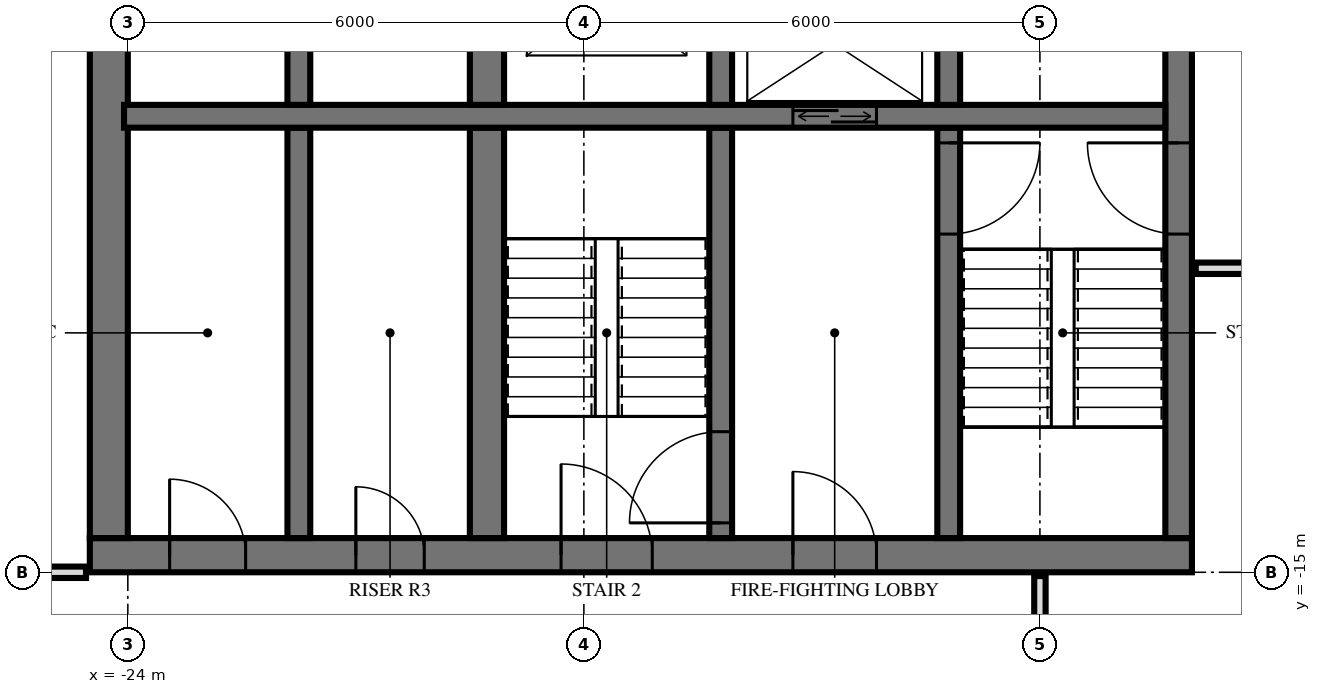
"""IFC4 building model, lengths in metres.
Left out: names, types, materials, properties, quantities, classifications, styles, units other than length and angle.
Written with IfcOpenShell. Run it as: python <this file> out.ifc"""

import sys

from ifc_helpers import new_model, si_unit, direction, frame, frame_2d, origin, place, context, subcontext, project, spatial, rectangle, extrude, element, fill, save


model = new_model("IFC4")
c1 = context("Model", 3, precision=1e-05, world=origin(), true_north=direction((0.0, 1.0)))
c2 = subcontext(c1, "Body", "Model", "MODEL_VIEW")
j1 = project(units=[si_unit("LENGTHUNIT", "METRE"), si_unit("PLANEANGLEUNIT", "RADIAN")], contexts=[c1])
p1 = place(None, origin())
s1 = spatial("IfcSite", under=j1, at=p1, CompositionType="ELEMENT")
p2 = place(p1, origin())
s2 = spatial("IfcBuilding", under=s1, at=p2, CompositionType="ELEMENT")
p3 = place(p2, frame((0.0, 0.0, 141.6)))
s3 = spatial("IfcBuildingStorey", under=s2, at=p3, CompositionType="ELEMENT", Elevation=141.6)
p4 = place(p3, frame((-24.5, -14.775, 0.0), z_axis=(0.0, 0.0, 1.0), x_axis=(1.0, 0.0, 0.0)))
e1 = element("IfcWall", 1, at=p4, inside=s3, PredefinedType="SHEAR", context=c2, shape_type="SweptSolid", body=[
    extrude(rectangle(XDim=14.5, YDim=0.45, at=frame_2d((7.25, 0.0))), origin(), (0.0, 0.0, 1.0), 3.6),
])
p5 = place(p4, frame((6.2, 0.0, 0.0)))
e2 = element("IfcOpeningElement", 2, at=p5, cuts=e1, PredefinedType="OPENING", context=c2, shape_type="SweptSolid", body=[
    extrude(rectangle(XDim=1.2, YDim=2.1, at=frame_2d((0.6, 1.05))), frame((0.0, 0.235, 0.0), z_axis=(0.0, -1.0, 0.0), x_axis=(1.0, 0.0, 0.0)), (0.0, 0.0, 1.0), 0.47),
])
p6 = place(p4, frame((9.25, 0.0, 0.0)))
e3 = element("IfcOpeningElement", 3, at=p6, cuts=e1, PredefinedType="OPENING", context=c2, shape_type="SweptSolid", body=[
    extrude(rectangle(XDim=1.1, YDim=2.1, at=frame_2d((0.55, 1.05))), frame((0.0, 0.235, 0.0), z_axis=(0.0, -1.0, 0.0), x_axis=(1.0, 0.0, 0.0)), (0.0, 0.0, 1.0), 0.47),
])
p7 = place(p4, frame((3.5, 0.0, 0.0)))
e4 = element("IfcOpeningElement", 4, at=p7, cuts=e1, PredefinedType="OPENING", context=c2, shape_type="SweptSolid", body=[
    extrude(rectangle(XDim=0.9, YDim=2.1, at=frame_2d((0.45, 1.05))), frame((0.0, 0.235, 0.0), z_axis=(0.0, -1.0, 0.0), x_axis=(1.0, 0.0, 0.0)), (0.0, 0.0, 1.0), 0.47),
])
p8 = place(p4, frame((1.05, 0.0, 0.0)))
e5 = element("IfcOpeningElement", 5, at=p8, cuts=e1, PredefinedType="OPENING", context=c2, shape_type="SweptSolid", body=[
    extrude(rectangle(XDim=1.0, YDim=2.1, at=frame_2d((0.5, 1.05))), frame((0.0, 0.235, 0.0), z_axis=(0.0, -1.0, 0.0), x_axis=(1.0, 0.0, 0.0)), (0.0, 0.0, 1.0), 0.47),
])
p9 = place(p3, frame((-10.175, -14.55, 0.0), z_axis=(0.0, 0.0, 1.0), x_axis=(0.0, 1.0, 0.0)))
e6 = element("IfcWall", 6, at=p9, inside=s3, PredefinedType="SHEAR", context=c2, shape_type="SweptSolid", body=[
    extrude(rectangle(XDim=14.1, YDim=0.35, at=frame_2d((7.05, 0.0))), origin(), (0.0, 0.0, 1.0), 3.6),
])
p10 = place(p9, frame((8.4, 0.0, 0.0)))
e7 = element("IfcOpeningElement", 7, at=p10, cuts=e6, PredefinedType="OPENING", context=c2, shape_type="SweptSolid", body=[
    extrude(rectangle(XDim=1.4, YDim=2.4, at=frame_2d((0.7, 1.2))), frame((0.0, 0.185, 0.0), z_axis=(0.0, -1.0, 0.0), x_axis=(1.0, 0.0, 0.0)), (0.0, 0.0, 1.0), 0.37),
])
p11 = place(p9, frame((10.0, 0.0, 0.0)))
e8 = element("IfcOpeningElement", 8, at=p11, cuts=e6, PredefinedType="OPENING", context=c2, shape_type="SweptSolid", body=[
    extrude(rectangle(XDim=1.4, YDim=2.4, at=frame_2d((0.7, 1.2))), frame((0.0, 0.185, 0.0), z_axis=(0.0, -1.0, 0.0), x_axis=(1.0, 0.0, 0.0)), (0.0, 0.0, 1.0), 0.37),
])
p12 = place(p9, frame((4.0, 0.0, 0.0)))
e9 = element("IfcOpeningElement", 9, at=p12, cuts=e6, PredefinedType="OPENING", context=c2, shape_type="SweptSolid", body=[
    extrude(rectangle(XDim=1.2, YDim=2.1, at=frame_2d((0.6, 1.05))), frame((0.0, 0.185, 0.0), z_axis=(0.0, -1.0, 0.0), x_axis=(1.0, 0.0, 0.0)), (0.0, 0.0, 1.0), 0.37),
])
p13 = place(p3, frame((-24.25, -14.55, 0.0), z_axis=(0.0, 0.0, 1.0), x_axis=(0.0, 1.0, 0.0)))
e10 = element("IfcWall", 10, at=p13, inside=s3, PredefinedType="SHEAR", context=c2, shape_type="SweptSolid", body=[
    extrude(rectangle(XDim=14.1, YDim=0.5, at=frame_2d((7.05, 0.0))), origin(), (0.0, 0.0, 1.0), 3.6),
])
p14 = place(p3, frame((-24.05, -9.0, 0.0), z_axis=(0.0, 0.0, 1.0), x_axis=(1.0, 0.0, 0.0)))
e11 = element("IfcWall", 11, at=p14, inside=s3, PredefinedType="SHEAR", context=c2, shape_type="SweptSolid", body=[
    extrude(rectangle(XDim=13.7, YDim=0.3, at=frame_2d((6.85, 0.0))), origin(), (0.0, 0.0, 1.0), 3.6),
])
p15 = place(p14, frame((8.8, 0.0, 0.0)))
e12 = element("IfcOpeningElement", 12, at=p15, cuts=e11, PredefinedType="OPENING", context=c2, shape_type="SweptSolid", body=[
    extrude(rectangle(XDim=1.1, YDim=2.1, at=frame_2d((0.55, 1.05))), frame((0.0, 0.16, 0.0), z_axis=(0.0, -1.0, 0.0), x_axis=(1.0, 0.0, 0.0)), (0.0, 0.0, 1.0), 0.32),
])
p16 = place(p3, frame((-13.2, -8.85, 0.0), z_axis=(0.0, 0.0, 1.0), x_axis=(0.0, 1.0, 0.0)))
e13 = element("IfcWall", 13, at=p16, inside=s3, PredefinedType="SHEAR", context=c2, shape_type="SweptSolid", body=[
    extrude(rectangle(XDim=2.3, YDim=0.3, at=frame_2d((1.15, 0.0))), origin(), (0.0, 0.0, 1.0), 3.6),
])
p17 = place(p3, frame((-13.2, -14.55, 0.0), z_axis=(0.0, 0.0, 1.0), x_axis=(0.0, 1.0, 0.0)))
e14 = element("IfcWall", 14, at=p17, inside=s3, PredefinedType="SHEAR", context=c2, shape_type="SweptSolid", body=[
    extrude(rectangle(XDim=5.4, YDim=0.3, at=frame_2d((2.7, 0.0))), origin(), (0.0, 0.0, 1.0), 3.6),
])
p18 = place(p17, frame((4.0, 0.0, 0.0)))
e15 = element("IfcOpeningElement", 15, at=p18, cuts=e14, PredefinedType="OPENING", context=c2, shape_type="SweptSolid", body=[
    extrude(rectangle(XDim=1.2, YDim=2.1, at=frame_2d((0.6, 1.05))), frame((0.0, 0.16, 0.0), z_axis=(0.0, -1.0, 0.0), x_axis=(1.0, 0.0, 0.0)), (0.0, 0.0, 1.0), 0.32),
])
p19 = place(p3, frame((-16.2, -8.85, 0.0), z_axis=(0.0, 0.0, 1.0), x_axis=(0.0, 1.0, 0.0)))
e16 = element("IfcWall", 16, at=p19, inside=s3, PredefinedType="SHEAR", context=c2, shape_type="SweptSolid", body=[
    extrude(rectangle(XDim=2.3, YDim=0.3, at=frame_2d((1.15, 0.0))), origin(), (0.0, 0.0, 1.0), 3.6),
])
p20 = place(p3, frame((-16.2, -14.55, 0.0), z_axis=(0.0, 0.0, 1.0), x_axis=(0.0, 1.0, 0.0)))
e17 = element("IfcWall", 17, at=p20, inside=s3, PredefinedType="SHEAR", context=c2, shape_type="SweptSolid", body=[
    extrude(rectangle(XDim=5.4, YDim=0.3, at=frame_2d((2.7, 0.0))), origin(), (0.0, 0.0, 1.0), 3.6),
])
p21 = place(p20, frame((0.2, 0.0, 0.0)))
e18 = element("IfcOpeningElement", 18, at=p21, cuts=e17, PredefinedType="OPENING", context=c2, shape_type="SweptSolid", body=[
    extrude(rectangle(XDim=1.2, YDim=2.1, at=frame_2d((0.6, 1.05))), frame((0.0, 0.16, 0.0), z_axis=(0.0, -1.0, 0.0), x_axis=(1.0, 0.0, 0.0)), (0.0, 0.0, 1.0), 0.32),
])
p22 = place(p3, frame((-19.275, -8.85, 0.0), z_axis=(0.0, 0.0, 1.0), x_axis=(0.0, 1.0, 0.0)))
e19 = element("IfcWall", 19, at=p22, inside=s3, PredefinedType="SHEAR", context=c2, shape_type="SweptSolid", body=[
    extrude(rectangle(XDim=2.3, YDim=0.45, at=frame_2d((1.15, 0.0))), origin(), (0.0, 0.0, 1.0), 3.6),
])
p23 = place(p3, frame((-19.275, -14.55, 0.0), z_axis=(0.0, 0.0, 1.0), x_axis=(0.0, 1.0, 0.0)))
e20 = element("IfcWall", 20, at=p23, inside=s3, PredefinedType="SHEAR", context=c2, shape_type="SweptSolid", body=[
    extrude(rectangle(XDim=5.4, YDim=0.45, at=frame_2d((2.7, 0.0))), origin(), (0.0, 0.0, 1.0), 3.6),
])
p24 = place(p3, frame((-21.75, -8.85, 0.0), z_axis=(0.0, 0.0, 1.0), x_axis=(0.0, 1.0, 0.0)))
e21 = element("IfcWall", 21, at=p24, inside=s3, PredefinedType="SHEAR", context=c2, shape_type="SweptSolid", body=[
    extrude(rectangle(XDim=2.3, YDim=0.3, at=frame_2d((1.15, 0.0))), origin(), (0.0, 0.0, 1.0), 3.6),
])
p25 = place(p3, frame((-21.75, -14.55, 0.0), z_axis=(0.0, 0.0, 1.0), x_axis=(0.0, 1.0, 0.0)))
e22 = element("IfcWall", 22, at=p25, inside=s3, PredefinedType="SHEAR", context=c2, shape_type="SweptSolid", body=[
    extrude(rectangle(XDim=5.4, YDim=0.3, at=frame_2d((2.7, 0.0))), origin(), (0.0, 0.0, 1.0), 3.6),
])
p26 = place(p3, frame((-12.0, -17.4, 0.0), z_axis=(0.0, 0.0, 1.0), x_axis=(0.0, 1.0, 0.0)))
e23 = element("IfcWall", 23, at=p26, inside=s3, PredefinedType="PARTITIONING", context=c2, shape_type="SweptSolid", body=[
    extrude(rectangle(XDim=2.35, YDim=0.15, at=frame_2d((1.175, 0.0))), origin(), (0.0, 0.0, 1.0), 3.32),
])
p27 = place(p26, frame((0.7, 0.0, 0.0)))
e24 = element("IfcOpeningElement", 24, at=p27, cuts=e23, PredefinedType="OPENING", context=c2, shape_type="SweptSolid", body=[
    extrude(rectangle(XDim=1.0, YDim=2.1, at=frame_2d((0.5, 1.05))), frame((0.0, 0.085, 0.0), z_axis=(0.0, -1.0, 0.0), x_axis=(1.0, 0.0, 0.0)), (0.0, 0.0, 1.0), 0.17),
])
p28 = place(p3, frame((-28.02, -15.0, 0.0), z_axis=(0.0, 0.0, 1.0), x_axis=(1.0, 0.0, 0.0)))
e25 = element("IfcWall", 25, at=p28, inside=s3, PredefinedType="PARTITIONING", context=c2, shape_type="SweptSolid", body=[
    extrude(rectangle(XDim=3.47, YDim=0.15, at=frame_2d((1.735, 0.0))), origin(), (0.0, 0.0, 1.0), 3.32),
])
p29 = place(p28, frame((1.57, 0.0, 0.0)))
e26 = element("IfcOpeningElement", 26, at=p29, cuts=e25, PredefinedType="OPENING", context=c2, shape_type="SweptSolid", body=[
    extrude(rectangle(XDim=1.0, YDim=2.1, at=frame_2d((0.5, 1.05))), frame((0.0, 0.085, 0.0), z_axis=(0.0, -1.0, 0.0), x_axis=(1.0, 0.0, 0.0)), (0.0, 0.0, 1.0), 0.17),
])
p30 = place(p3, frame((-9.95, -11.0, 0.0), z_axis=(0.0, 0.0, 1.0), x_axis=(1.0, 0.0, 0.0)))
e27 = element("IfcWall", 27, at=p30, inside=s3, PredefinedType="PARTITIONING", context=c2, shape_type="SweptSolid", body=[
    extrude(rectangle(XDim=19.9, YDim=0.15, at=frame_2d((9.95, 0.0))), origin(), (0.0, 0.0, 1.0), 3.32),
])
p31 = place(p30, frame((9.45, 0.0, 0.0)))
e28 = element("IfcOpeningElement", 28, at=p31, cuts=e27, PredefinedType="OPENING", context=c2, shape_type="SweptSolid", body=[
    extrude(rectangle(XDim=1.0, YDim=2.1, at=frame_2d((0.5, 1.05))), frame((0.0, 0.085, 0.0), z_axis=(0.0, -1.0, 0.0), x_axis=(1.0, 0.0, 0.0)), (0.0, 0.0, 1.0), 0.17),
])
p32 = place(p30, frame((15.45, 0.0, 0.0)))
e29 = element("IfcOpeningElement", 29, at=p32, cuts=e27, PredefinedType="OPENING", context=c2, shape_type="SweptSolid", body=[
    extrude(rectangle(XDim=1.0, YDim=2.1, at=frame_2d((0.5, 1.05))), frame((0.0, 0.085, 0.0), z_axis=(0.0, -1.0, 0.0), x_axis=(1.0, 0.0, 0.0)), (0.0, 0.0, 1.0), 0.17),
])
p33 = place(p15, origin())
e30 = element("IfcDoor", 30, at=p33, inside=s3, OperationType="DOUBLE_DOOR_SLIDING", PredefinedType="USERDEFINED", context=c2, shape_type="SweptSolid", body=[
    extrude(rectangle(XDim=1.1, YDim=2.1, at=frame_2d((0.55, 1.05))), frame((0.0, 0.025, 0.0), z_axis=(0.0, -1.0, 0.0), x_axis=(1.0, 0.0, 0.0)), (0.0, 0.0, 1.0), 0.05),
])
fill(e12, e30)
p34 = place(p12, origin())
e31 = element("IfcDoor", 31, at=p34, inside=s3, OperationType="SINGLE_SWING_LEFT", PredefinedType="DOOR", context=c2, shape_type="SweptSolid", body=[
    extrude(rectangle(XDim=1.2, YDim=2.1, at=frame_2d((0.6, 1.05))), frame((0.0, 0.025, 0.0), z_axis=(0.0, -1.0, 0.0), x_axis=(1.0, 0.0, 0.0)), (0.0, 0.0, 1.0), 0.05),
])
fill(e9, e31)
p35 = place(p5, origin())
e32 = element("IfcDoor", 32, at=p35, inside=s3, OperationType="SINGLE_SWING_RIGHT", PredefinedType="DOOR", context=c2, shape_type="SweptSolid", body=[
    extrude(rectangle(XDim=1.2, YDim=2.1, at=frame_2d((0.6, 1.05))), frame((0.0, 0.025, 0.0), z_axis=(0.0, -1.0, 0.0), x_axis=(1.0, 0.0, 0.0)), (0.0, 0.0, 1.0), 0.05),
])
fill(e2, e32)
p36 = place(p6, origin())
e33 = element("IfcDoor", 33, at=p36, inside=s3, OperationType="SINGLE_SWING_RIGHT", PredefinedType="DOOR", context=c2, shape_type="SweptSolid", body=[
    extrude(rectangle(XDim=1.1, YDim=2.1, at=frame_2d((0.55, 1.05))), frame((0.0, 0.025, 0.0), z_axis=(0.0, -1.0, 0.0), x_axis=(1.0, 0.0, 0.0)), (0.0, 0.0, 1.0), 0.05),
])
fill(e3, e33)
p37 = place(p7, origin())
e34 = element("IfcDoor", 34, at=p37, inside=s3, OperationType="SINGLE_SWING_RIGHT", PredefinedType="DOOR", context=c2, shape_type="SweptSolid", body=[
    extrude(rectangle(XDim=0.9, YDim=2.1, at=frame_2d((0.45, 1.05))), frame((0.0, 0.025, 0.0), z_axis=(0.0, -1.0, 0.0), x_axis=(1.0, 0.0, 0.0)), (0.0, 0.0, 1.0), 0.05),
])
fill(e4, e34)
p38 = place(p8, origin())
e35 = element("IfcDoor", 35, at=p38, inside=s3, OperationType="SINGLE_SWING_RIGHT", PredefinedType="DOOR", context=c2, shape_type="SweptSolid", body=[
    extrude(rectangle(XDim=1.0, YDim=2.1, at=frame_2d((0.5, 1.05))), frame((0.0, 0.025, 0.0), z_axis=(0.0, -1.0, 0.0), x_axis=(1.0, 0.0, 0.0)), (0.0, 0.0, 1.0), 0.05),
])
fill(e5, e35)
p39 = place(p18, frame((0.6, 0.0, 0.0), z_axis=(0.0, 0.0, 1.0), x_axis=(-1.0, 0.0, 0.0)))
e36 = element("IfcDoor", 36, at=p39, inside=s3, OperationType="SINGLE_SWING_RIGHT", PredefinedType="DOOR", context=c2, shape_type="SweptSolid", body=[
    extrude(rectangle(XDim=1.2, YDim=2.1, at=frame_2d((0.0, 1.05))), frame((0.0, -0.025, 0.0), z_axis=(0.0, 1.0, 0.0), x_axis=(-1.0, 0.0, 0.0)), (0.0, 0.0, 1.0), 0.05),
])
fill(e15, e36)
p40 = place(p21, origin())
e37 = element("IfcDoor", 37, at=p40, inside=s3, OperationType="SINGLE_SWING_RIGHT", PredefinedType="DOOR", context=c2, shape_type="SweptSolid", body=[
    extrude(rectangle(XDim=1.2, YDim=2.1, at=frame_2d((0.6, 1.05))), frame((0.0, 0.025, 0.0), z_axis=(0.0, -1.0, 0.0), x_axis=(1.0, 0.0, 0.0)), (0.0, 0.0, 1.0), 0.05),
])
fill(e18, e37)
save(model, sys.argv[1])
